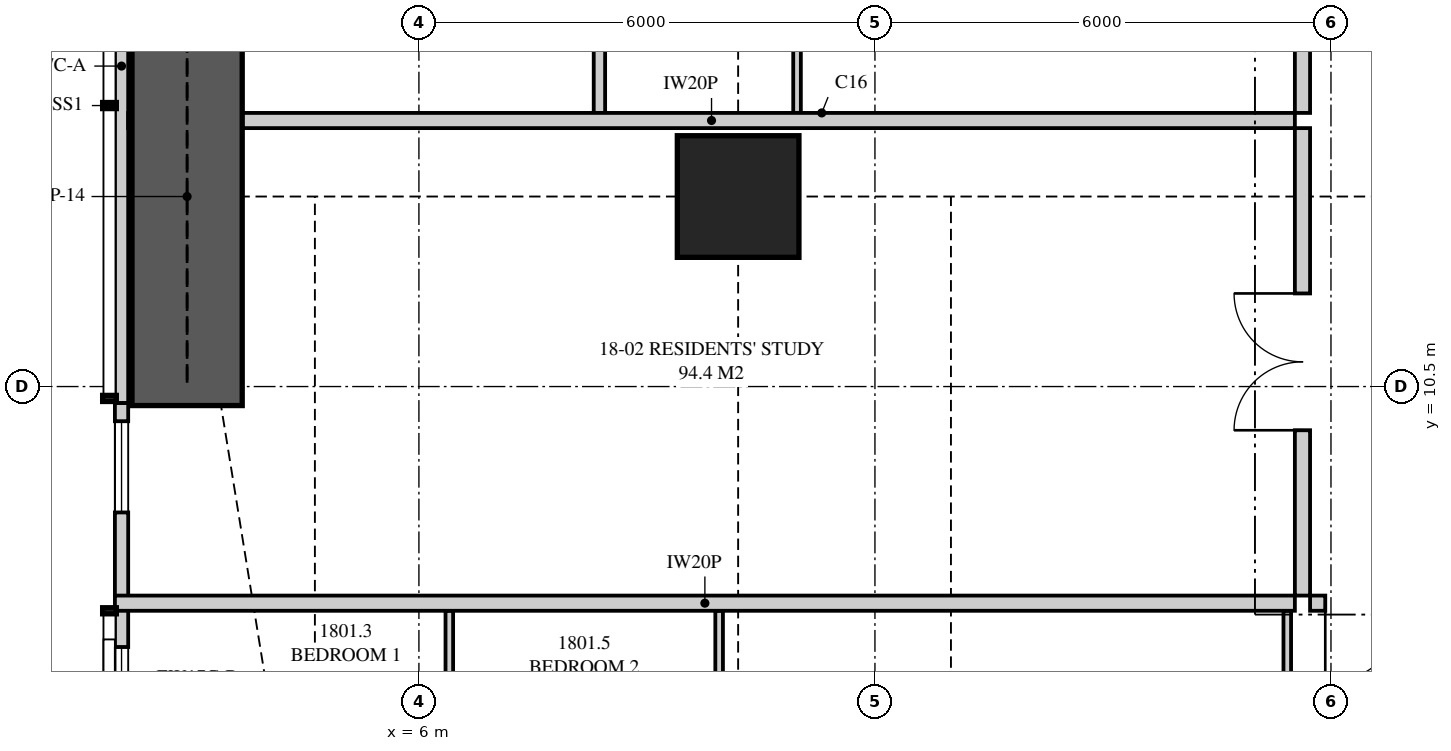
"""IFC4 building model, lengths in metres.
Left out: names, types, materials, properties, quantities, classifications, styles, units other than length and angle.
Written with IfcOpenShell. Run it as: python <this file> out.ifc"""

import sys

from ifc_helpers import new_model, si_unit, direction, frame, frame_2d, origin, origin_2d, place, context, subcontext, project, spatial, polyline, rectangle, outline, extrude, element, fill, save


model = new_model("IFC4")
c1 = context("Model", 3, precision=1e-05, world=origin(), true_north=direction((0.0, 1.0)))
c2 = subcontext(c1, "Body", "Model", "MODEL_VIEW")
j1 = project(units=[si_unit("LENGTHUNIT", "METRE"), si_unit("PLANEANGLEUNIT", "RADIAN")], contexts=[c1])
p1 = place(None, origin())
s1 = spatial("IfcSite", under=j1, at=p1, CompositionType="ELEMENT")
p2 = place(p1, origin())
s2 = spatial("IfcBuilding", under=s1, at=p2, CompositionType="ELEMENT")
p3 = place(p2, frame((0.0, 0.0, 67.9)))
s3 = spatial("IfcBuildingStorey", under=s2, at=p3, CompositionType="ELEMENT", Elevation=67.9)
p4 = place(p3, frame((10.2, 13.0, 0.0), z_axis=(0.0, 0.0, 1.0), x_axis=(1.0, 0.0, 0.0)))
e1 = element("IfcColumn", 1, at=p4, inside=s3, PredefinedType="COLUMN", context=c2, shape_type="SweptSolid", body=[
    extrude(rectangle(XDim=1.6, YDim=1.6, at=origin_2d()), origin(), (0.0, 0.0, 1.0), 3.35),
])
p5 = place(p3, frame((2.087, 19.15, 0.0), z_axis=(0.0, 0.0, 1.0), x_axis=(0.0, -1.0, 0.0)))
e2 = element("IfcWall", 2, at=p5, inside=s3, PredefinedType="SOLIDWALL", context=c2, shape_type="SweptSolid", body=[
    extrude(rectangle(XDim=8.867, YDim=0.175, at=frame_2d((4.434, 0.0))), origin(), (0.0, 0.0, 1.0), 2.15),
])
p6 = place(p5, frame((1.488, 0.0, 0.4)))
e3 = element("IfcOpeningElement", 3, at=p6, cuts=e2, PredefinedType="OPENING", context=c2, shape_type="SweptSolid", body=[
    extrude(rectangle(XDim=1.8, YDim=1.7, at=frame_2d((0.9, 0.85))), frame((0.0, 0.097, 0.0), z_axis=(0.0, -1.0, 0.0), x_axis=(1.0, 0.0, 0.0)), (0.0, 0.0, 1.0), 0.195),
])
p7 = place(p3, frame((2.087, 10.282, 0.0), z_axis=(0.0, 0.0, 1.0), x_axis=(0.0, -1.0, 0.0)))
e4 = element("IfcWall", 4, at=p7, inside=s3, PredefinedType="SOLIDWALL", context=c2, shape_type="SweptSolid", body=[
    extrude(rectangle(XDim=7.231, YDim=0.175, at=frame_2d((3.616, 0.0))), origin(), (0.0, 0.0, 1.0), 3.11),
])
p8 = place(p7, frame((0.239, 0.0, 0.4)))
e5 = element("IfcOpeningElement", 5, at=p8, cuts=e4, PredefinedType="OPENING", context=c2, shape_type="SweptSolid", body=[
    extrude(rectangle(XDim=1.2, YDim=1.7, at=frame_2d((0.6, 0.85))), frame((0.0, 0.097, 0.0), z_axis=(0.0, -1.0, 0.0), x_axis=(1.0, 0.0, 0.0)), (0.0, 0.0, 1.0), 0.195),
])
p9 = place(p7, frame((3.209, 0.0, 0.4)))
e6 = element("IfcOpeningElement", 6, at=p9, cuts=e4, PredefinedType="OPENING", context=c2, shape_type="SweptSolid", body=[
    extrude(rectangle(XDim=1.8, YDim=1.7, at=frame_2d((0.9, 0.85))), frame((0.0, 0.097, 0.0), z_axis=(0.0, -1.0, 0.0), x_axis=(1.0, 0.0, 0.0)), (0.0, 0.0, 1.0), 0.195),
])
p10 = place(p3, frame((17.725, 7.65, 0.0), z_axis=(0.0, 0.0, 1.0), x_axis=(1.0, 0.0, 0.0)))
e7 = element("IfcWall", 7, at=p10, inside=s3, PredefinedType="PARTITIONING", context=c2, shape_type="SweptSolid", body=[
    extrude(outline(polyline([(0.0, 0.0), (16.075, 0.0), (16.075, 3.11), (6.612, 3.11), (6.612, 2.541), (5.938, 2.541), (5.938, 3.11), (0.0, 3.11), (0.0, 0.0)])), frame((0.0, 0.1, 0.0), z_axis=(0.0, -1.0, 0.0), x_axis=(1.0, 0.0, 0.0)), (0.0, 0.0, 1.0), 0.2),
])
p11 = place(p10, frame((0.2, 0.0, 0.0)))
e8 = element("IfcOpeningElement", 8, at=p11, cuts=e7, PredefinedType="OPENING", context=c2, shape_type="SweptSolid", body=[
    extrude(rectangle(XDim=1.05, YDim=2.2, at=frame_2d((0.525, 1.1))), frame((0.0, 0.11, 0.0), z_axis=(0.0, -1.0, 0.0), x_axis=(1.0, 0.0, 0.0)), (0.0, 0.0, 1.0), 0.22),
])
p12 = place(p3, frame((6.4, 0.175, 0.0), z_axis=(0.0, 0.0, 1.0), x_axis=(0.0, 1.0, 0.0)))
e9 = element("IfcWall", 9, at=p12, inside=s3, PredefinedType="PARTITIONING", context=c2, shape_type="SweptSolid", body=[
    extrude(outline(polyline([(0.0, 0.0), (7.375, 0.0), (7.375, 3.11), (3.386, 3.11), (3.386, 2.15), (0.816, 2.15), (0.816, 3.11), (0.0, 3.11), (0.0, 0.0)])), frame((0.0, 0.05, 0.0), z_axis=(0.0, -1.0, 0.0), x_axis=(1.0, 0.0, 0.0)), (0.0, 0.0, 1.0), 0.1),
])
p13 = place(p12, frame((3.422, 0.0, 0.0)))
e10 = element("IfcOpeningElement", 10, at=p13, cuts=e9, PredefinedType="OPENING", context=c2, shape_type="SweptSolid", body=[
    extrude(rectangle(XDim=0.9, YDim=2.1, at=frame_2d((0.45, 1.05))), frame((0.0, 0.06, 0.0), z_axis=(0.0, -1.0, 0.0), x_axis=(1.0, 0.0, 0.0)), (0.0, 0.0, 1.0), 0.12),
])
p14 = place(p12, frame((5.523, 0.0, 0.0)))
e11 = element("IfcOpeningElement", 11, at=p14, cuts=e9, PredefinedType="OPENING", context=c2, shape_type="SweptSolid", body=[
    extrude(rectangle(XDim=0.9, YDim=2.1, at=frame_2d((0.45, 1.05))), frame((0.0, 0.06, 0.0), z_axis=(0.0, -1.0, 0.0), x_axis=(1.0, 0.0, 0.0)), (0.0, 0.0, 1.0), 0.12),
])
p15 = place(p3, frame((9.95, 1.513, 0.0), z_axis=(0.0, 0.0, 1.0), x_axis=(0.0, 1.0, 0.0)))
e12 = element("IfcWall", 12, at=p15, inside=s3, PredefinedType="PARTITIONING", context=c2, shape_type="SweptSolid", body=[
    extrude(outline(polyline([(0.0, 0.0), (6.037, 0.0), (6.037, 2.51), (1.335, 2.51), (1.335, 2.15), (0.0, 2.15), (0.0, 0.0)])), frame((0.0, 0.05, 0.0), z_axis=(0.0, -1.0, 0.0), x_axis=(1.0, 0.0, 0.0)), (0.0, 0.0, 1.0), 0.1),
])
p16 = place(p15, frame((2.188, 0.0, 0.0)))
e13 = element("IfcOpeningElement", 13, at=p16, cuts=e12, PredefinedType="OPENING", context=c2, shape_type="SweptSolid", body=[
    extrude(rectangle(XDim=0.9, YDim=2.1, at=frame_2d((0.45, 1.05))), frame((0.0, 0.06, 0.0), z_axis=(0.0, -1.0, 0.0), x_axis=(1.0, 0.0, 0.0)), (0.0, 0.0, 1.0), 0.12),
])
p17 = place(p3, frame((17.425, 0.175, 0.0), z_axis=(0.0, 0.0, 1.0), x_axis=(0.0, 1.0, 0.0)))
e14 = element("IfcWall", 14, at=p17, inside=s3, PredefinedType="PARTITIONING", context=c2, shape_type="SweptSolid", body=[
    extrude(outline(polyline([(0.0, 0.0), (7.375, 0.0), (7.375, 3.11), (2.035, 3.11), (2.035, 2.15), (0.0, 2.15), (0.0, 3.11), (0.0, 0.0)])), frame((0.0, 0.05, 0.0), z_axis=(0.0, -1.0, 0.0), x_axis=(1.0, 0.0, 0.0)), (0.0, 0.0, 1.0), 0.1),
])
p18 = place(p17, frame((3.188, 0.0, 0.0)))
e15 = element("IfcOpeningElement", 15, at=p18, cuts=e14, PredefinedType="OPENING", context=c2, shape_type="SweptSolid", body=[
    extrude(rectangle(XDim=1.0, YDim=2.1, at=frame_2d((0.5, 1.05))), frame((0.0, 0.06, 0.0), z_axis=(0.0, -1.0, 0.0), x_axis=(1.0, 0.0, 0.0)), (0.0, 0.0, 1.0), 0.12),
])
p19 = place(p3, frame((2.0, 7.65, 0.0), z_axis=(0.0, 0.0, 1.0), x_axis=(1.0, 0.0, 0.0)))
e16 = element("IfcWall", 16, at=p19, inside=s3, PredefinedType="PARTITIONING", context=c2, shape_type="SweptSolid", body=[
    extrude(outline(polyline([(0.0, 0.0), (15.525, 0.0), (15.525, 3.11), (11.337, 3.11), (11.337, 2.541), (10.663, 2.541), (10.663, 3.11), (9.51, 3.11), (9.51, 2.51), (6.89, 2.51), (6.89, 3.11), (3.145, 3.11), (3.145, 2.15), (0.49, 2.15), (0.49, 3.11), (0.0, 3.11), (0.0, 0.0)])), frame((0.0, 0.1, 0.0), z_axis=(0.0, -1.0, 0.0), x_axis=(1.0, 0.0, 0.0)), (0.0, 0.0, 1.0), 0.2),
])
p20 = place(p3, frame((2.175, 14.0, 0.0), z_axis=(0.0, 0.0, 1.0), x_axis=(1.0, 0.0, 0.0)))
e17 = element("IfcWall", 17, at=p20, inside=s3, PredefinedType="PARTITIONING", context=c2, shape_type="SweptSolid", body=[
    extrude(outline(polyline([(0.529, 2.15), (0.0, 2.15), (0.0, 0.0), (0.529, 0.0), (0.529, 0.821), (1.021, 0.821), (1.021, 0.0), (15.35, 0.0), (15.35, 3.11), (9.335, 3.11), (9.335, 2.51), (6.715, 2.51), (6.715, 3.11), (2.085, 3.11), (2.085, 2.15), (1.021, 2.15), (1.021, 1.33), (0.529, 1.33), (0.529, 2.15)])), frame((0.0, 0.1, 0.0), z_axis=(0.0, -1.0, 0.0), x_axis=(1.0, 0.0, 0.0)), (0.0, 0.0, 1.0), 0.2),
])
p21 = place(p3, frame((17.625, 7.75, 0.0), z_axis=(0.0, 0.0, 1.0), x_axis=(0.0, 1.0, 0.0)))
e18 = element("IfcWall", 18, at=p21, inside=s3, PredefinedType="PARTITIONING", context=c2, shape_type="SweptSolid", body=[
    extrude(outline(polyline([(0.0, 0.0), (6.15, 0.0), (6.15, 3.11), (5.587, 3.11), (5.587, 2.541), (4.913, 2.541), (4.913, 3.11), (0.0, 3.11), (0.0, 0.0)])), frame((0.0, 0.1, 0.0), z_axis=(0.0, -1.0, 0.0), x_axis=(1.0, 0.0, 0.0)), (0.0, 0.0, 1.0), 0.2),
])
p22 = place(p21, frame((2.175, 0.0, 0.0)))
e19 = element("IfcOpeningElement", 19, at=p22, cuts=e18, PredefinedType="OPENING", context=c2, shape_type="SweptSolid", body=[
    extrude(rectangle(XDim=1.8, YDim=2.1, at=frame_2d((0.9, 1.05))), frame((0.0, 0.11, 0.0), z_axis=(0.0, -1.0, 0.0), x_axis=(1.0, 0.0, 0.0)), (0.0, 0.0, 1.0), 0.22),
])
p23 = place(p3, frame((17.625, 14.1, 0.0), z_axis=(0.0, 0.0, 1.0), x_axis=(0.0, 1.0, 0.0)))
e20 = element("IfcWall", 20, at=p23, inside=s3, PredefinedType="PARTITIONING", context=c2, shape_type="SweptSolid", body=[
    extrude(outline(polyline([(0.0, 0.0), (15.15, 0.0), (15.15, 3.11), (11.237, 3.11), (11.237, 2.541), (10.562, 2.541), (10.562, 3.11), (0.0, 3.11), (0.0, 0.0)])), frame((0.0, 0.1, 0.0), z_axis=(0.0, -1.0, 0.0), x_axis=(1.0, 0.0, 0.0)), (0.0, 0.0, 1.0), 0.2),
])
p24 = place(p23, frame((7.075, 0.0, 0.0)))
e21 = element("IfcOpeningElement", 21, at=p24, cuts=e20, PredefinedType="OPENING", context=c2, shape_type="SweptSolid", body=[
    extrude(rectangle(XDim=1.05, YDim=2.2, at=frame_2d((0.525, 1.1))), frame((0.0, 0.11, 0.0), z_axis=(0.0, -1.0, 0.0), x_axis=(1.0, 0.0, 0.0)), (0.0, 0.0, 1.0), 0.22),
])
p25 = place(p3, frame((8.375, 14.1, 0.0), z_axis=(0.0, 0.0, 1.0), x_axis=(0.0, 1.0, 0.0)))
e22 = element("IfcWall", 22, at=p25, inside=s3, PredefinedType="PLUMBINGWALL", context=c2, shape_type="SweptSolid", body=[
    extrude(rectangle(XDim=3.95, YDim=0.15, at=frame_2d((1.975, 0.0))), origin(), (0.0, 0.0, 1.0), 3.11),
])
p26 = place(p25, frame((2.65, 0.0, 0.0)))
e23 = element("IfcOpeningElement", 23, at=p26, cuts=e22, PredefinedType="OPENING", context=c2, shape_type="SweptSolid", body=[
    extrude(rectangle(XDim=0.9, YDim=2.1, at=frame_2d((0.45, 1.05))), frame((0.0, 0.085, 0.0), z_axis=(0.0, -1.0, 0.0), x_axis=(1.0, 0.0, 0.0)), (0.0, 0.0, 1.0), 0.17),
])
p27 = place(p3, frame((10.975, 14.1, 0.0), z_axis=(0.0, 0.0, 1.0), x_axis=(0.0, 1.0, 0.0)))
e24 = element("IfcWall", 24, at=p27, inside=s3, PredefinedType="PARTITIONING", context=c2, shape_type="SweptSolid", body=[
    extrude(outline(polyline([(0.0, 0.0), (3.95, 0.0), (3.95, 3.11), (3.95, 2.51), (0.0, 2.51), (0.0, 3.11), (0.0, 0.0)])), frame((0.0, 0.05, 0.0), z_axis=(0.0, -1.0, 0.0), x_axis=(1.0, 0.0, 0.0)), (0.0, 0.0, 1.0), 0.1),
])
p28 = place(p3, frame((2.95, 10.25, 0.0), z_axis=(0.0, 0.0, 1.0), x_axis=(0.0, 1.0, 0.0)))
e25 = element("IfcWall", 25, at=p28, inside=s3, PredefinedType="SHEAR", context=c2, shape_type="SweptSolid", body=[
    extrude(rectangle(XDim=5.5, YDim=1.45, at=frame_2d((2.75, 0.0))), origin(), (0.0, 0.0, 1.0), 3.35),
])
p29 = place(p8, origin())
e26 = element("IfcWindow", 26, at=p29, inside=s3, PartitioningType="SINGLE_PANEL", PredefinedType="WINDOW", context=c2, shape_type="SweptSolid", body=[
    extrude(rectangle(XDim=1.2, YDim=1.7, at=frame_2d((0.6, 0.85))), frame((0.0, 0.03, 0.0), z_axis=(0.0, -1.0, 0.0), x_axis=(1.0, 0.0, 0.0)), (0.0, 0.0, 1.0), 0.06),
])
fill(e5, e26)
p30 = place(p9, origin())
e27 = element("IfcWindow", 27, at=p30, inside=s3, PartitioningType="SINGLE_PANEL", PredefinedType="WINDOW", context=c2, shape_type="SweptSolid", body=[
    extrude(rectangle(XDim=1.8, YDim=1.7, at=frame_2d((0.9, 0.85))), frame((0.0, 0.03, 0.0), z_axis=(0.0, -1.0, 0.0), x_axis=(1.0, 0.0, 0.0)), (0.0, 0.0, 1.0), 0.06),
])
fill(e6, e27)
p31 = place(p11, frame((1.05, 0.0, 0.0), z_axis=(0.0, 0.0, 1.0), x_axis=(-1.0, 0.0, 0.0)))
e28 = element("IfcDoor", 28, at=p31, inside=s3, OperationType="SINGLE_SWING_RIGHT", PredefinedType="DOOR", context=c2, shape_type="SweptSolid", body=[
    extrude(rectangle(XDim=1.05, YDim=2.2, at=frame_2d((0.525, 1.1))), frame((0.0, 0.025, 0.0), z_axis=(0.0, -1.0, 0.0), x_axis=(1.0, 0.0, 0.0)), (0.0, 0.0, 1.0), 0.05),
])
fill(e8, e28)
p32 = place(p22, origin())
e29 = element("IfcDoor", 29, at=p32, inside=s3, OperationType="DOUBLE_DOOR_SINGLE_SWING", PredefinedType="DOOR", context=c2, shape_type="SweptSolid", body=[
    extrude(rectangle(XDim=1.8, YDim=2.1, at=frame_2d((0.9, 1.05))), frame((0.0, 0.025, 0.0), z_axis=(0.0, -1.0, 0.0), x_axis=(1.0, 0.0, 0.0)), (0.0, 0.0, 1.0), 0.05),
])
fill(e19, e29)
save(model, sys.argv[1])
